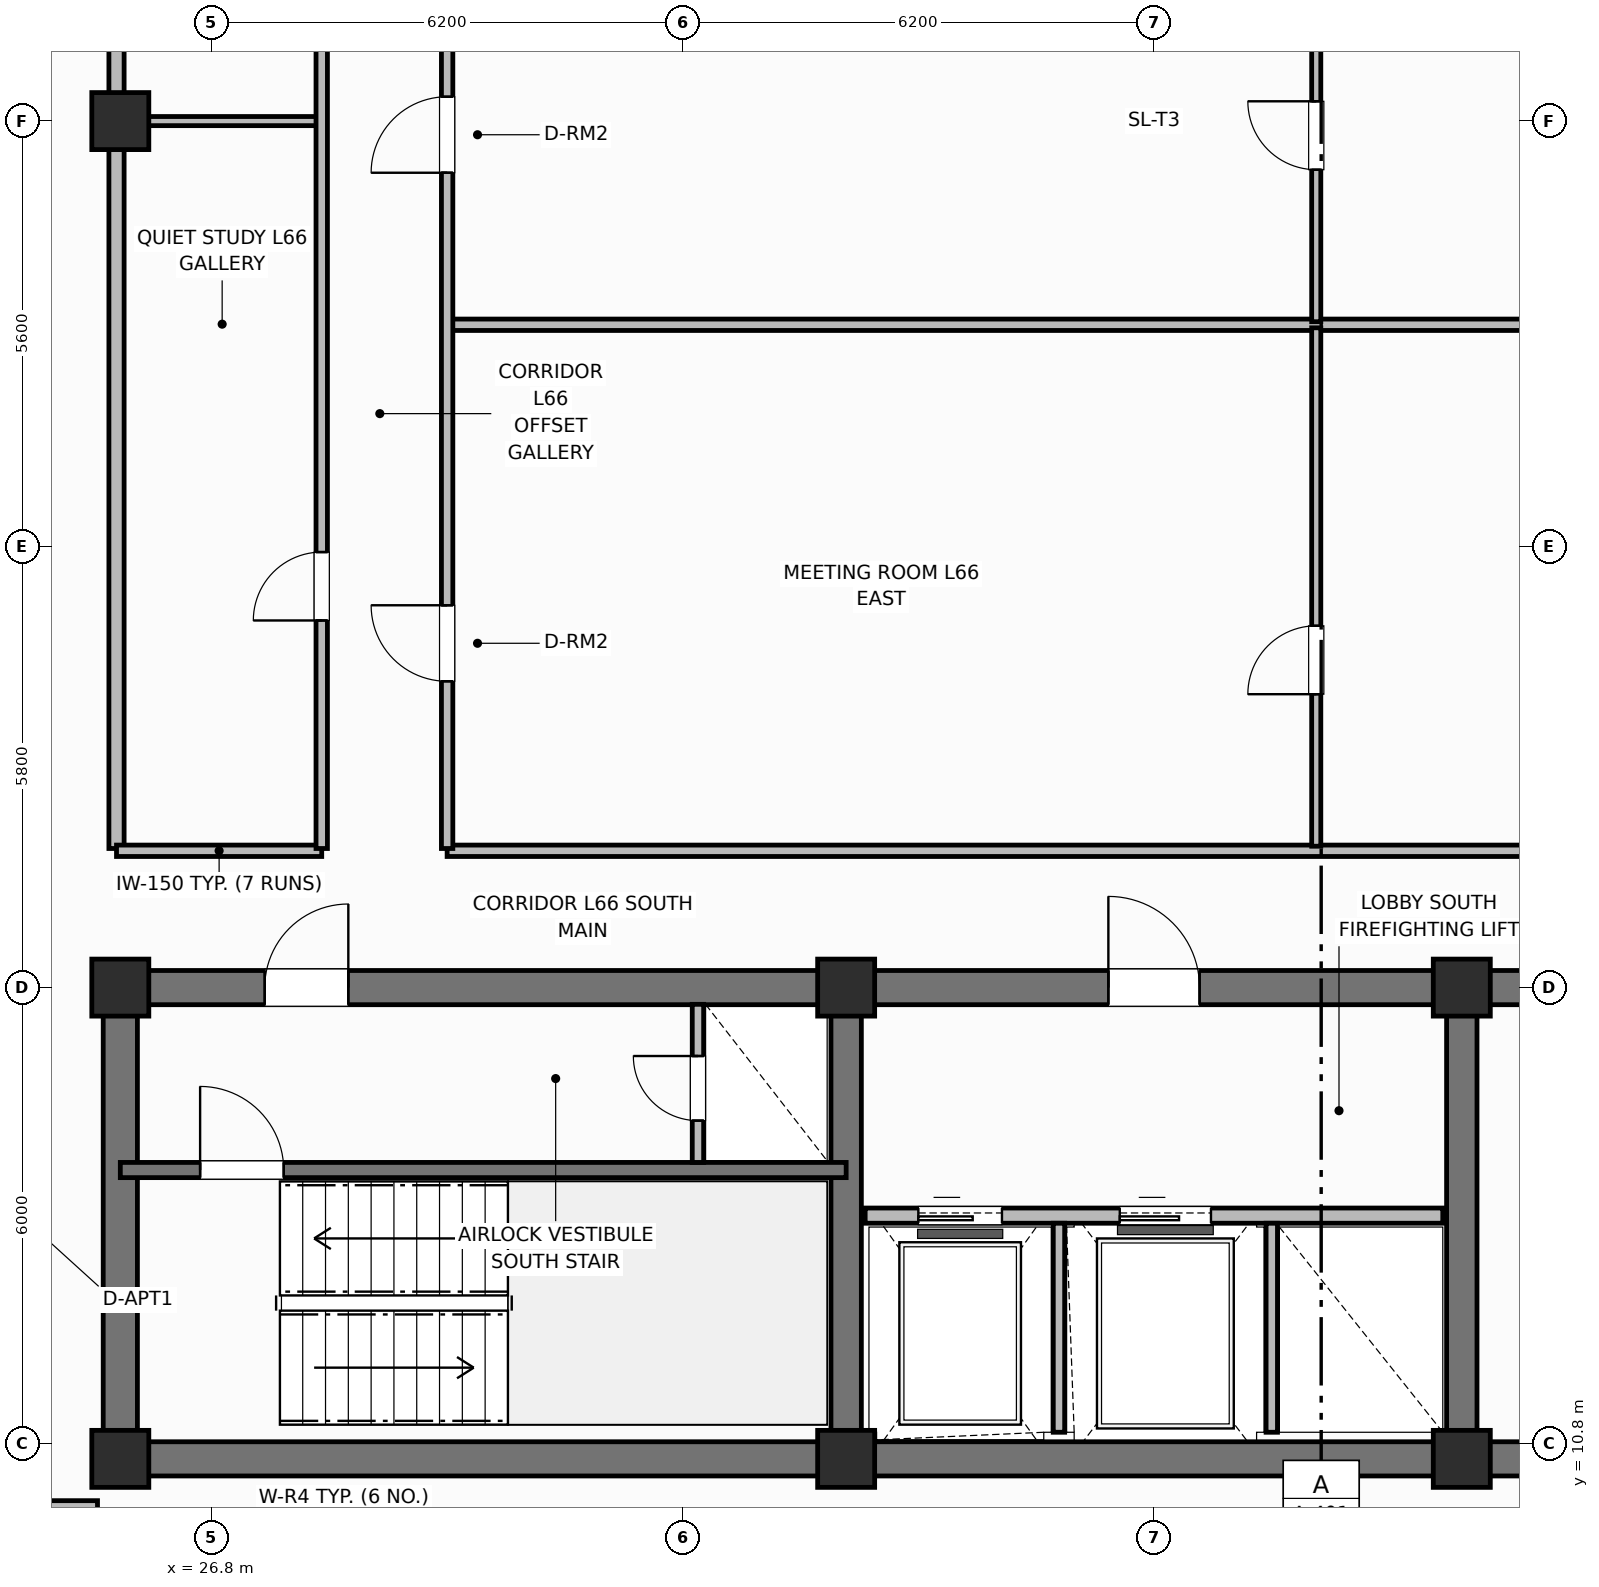
"""IFC4 building model, lengths in metres.
Left out: names, types, materials, properties, quantities, classifications, styles, units other than length and angle.
Written with IfcOpenShell. Run it as: python <this file> out.ifc"""

import sys

from ifc_helpers import new_model, si_unit, direction, frame, frame_2d, origin, origin_2d, place, context, subcontext, project, spatial, rectangle, extrude, element, fill, save


model = new_model("IFC4")
c1 = context("Model", 3, precision=1e-05, world=origin(), true_north=direction((0.0, 1.0)))
c2 = subcontext(c1, "Body", "Model", "MODEL_VIEW")
j1 = project(units=[si_unit("LENGTHUNIT", "METRE"), si_unit("PLANEANGLEUNIT", "RADIAN")], contexts=[c1])
p1 = place(None, origin())
s1 = spatial("IfcSite", under=j1, at=p1, CompositionType="ELEMENT")
p2 = place(p1, origin())
s2 = spatial("IfcBuilding", under=s1, at=p2, CompositionType="ELEMENT")
p3 = place(p2, frame((0.0, 0.0, 263.9)))
s3 = spatial("IfcBuildingStorey", under=s2, at=p3, CompositionType="ELEMENT", Elevation=263.9)
p4 = place(p3, frame((52.8, 10.6, 0.0), z_axis=(0.0, 0.0, 1.0), x_axis=(-1.0, 0.0, 0.0)))
e1 = element("IfcWall", 1, at=p4, inside=s3, PredefinedType="SHEAR", context=c2, shape_type="SweptSolid", body=[
    extrude(rectangle(XDim=27.2, YDim=0.45, at=frame_2d((13.6, 0.0))), origin(), (0.0, 0.0, 1.0), 3.7),
])
p5 = place(p3, frame((25.6, 10.825, 0.0), z_axis=(0.0, 0.0, 1.0), x_axis=(0.0, 1.0, 0.0)))
e2 = element("IfcWall", 2, at=p5, inside=s3, PredefinedType="SHEAR", context=c2, shape_type="SweptSolid", body=[
    extrude(rectangle(XDim=5.75, YDim=0.45, at=frame_2d((2.875, 0.0))), origin(), (0.0, 0.0, 1.0), 3.7),
])
p6 = place(p3, frame((25.6, 16.8, 0.0), z_axis=(0.0, 0.0, 1.0), x_axis=(1.0, 0.0, 0.0)))
e3 = element("IfcWall", 3, at=p6, inside=s3, PredefinedType="SHEAR", context=c2, shape_type="SweptSolid", body=[
    extrude(rectangle(XDim=27.2, YDim=0.45, at=frame_2d((13.6, 0.0))), origin(), (0.0, 0.0, 1.0), 3.7),
])
p7 = place(p6, frame((1.9, 0.0, 0.0)))
e4 = element("IfcOpeningElement", 4, at=p7, cuts=e3, PredefinedType="OPENING", context=c2, shape_type="SweptSolid", body=[
    extrude(rectangle(XDim=1.1, YDim=2.15, at=frame_2d((0.55, 1.075))), frame((0.0, 0.235, 0.0), z_axis=(0.0, -1.0, 0.0), x_axis=(1.0, 0.0, 0.0)), (0.0, 0.0, 1.0), 0.47),
])
p8 = place(p6, frame((13.0, 0.0, 0.0)))
e5 = element("IfcOpeningElement", 5, at=p8, cuts=e3, PredefinedType="OPENING", context=c2, shape_type="SweptSolid", body=[
    extrude(rectangle(XDim=1.2, YDim=2.15, at=frame_2d((0.6, 1.075))), frame((0.0, 0.235, 0.0), z_axis=(0.0, -1.0, 0.0), x_axis=(1.0, 0.0, 0.0)), (0.0, 0.0, 1.0), 0.47),
])
p9 = place(p6, frame((21.6, 0.0, 0.0)))
e6 = element("IfcOpeningElement", 6, at=p9, cuts=e3, PredefinedType="OPENING", context=c2, shape_type="SweptSolid", body=[
    extrude(rectangle(XDim=1.0, YDim=2.15, at=frame_2d((0.5, 1.075))), frame((0.0, 0.235, 0.0), z_axis=(0.0, -1.0, 0.0), x_axis=(1.0, 0.0, 0.0)), (0.0, 0.0, 1.0), 0.47),
])
for number, where, z_axis, x_axis in (
    (7, (35.15, 10.825, 0.0), (0.0, 0.0, 1.0), (0.0, 1.0, 0.0)),
    (8, (43.25, 10.825, 0.0), (0.0, 0.0, 1.0), (0.0, 1.0, 0.0)),
):
    element("IfcWall", number, at=place(p3, frame(where, z_axis=z_axis, x_axis=x_axis)), inside=s3, PredefinedType="SHEAR", context=c2, shape_type="SweptSolid", body=[
        extrude(rectangle(XDim=5.75, YDim=0.4, at=frame_2d((2.875, 0.0))), origin(), (0.0, 0.0, 1.0), 3.7),
    ])
for number, where, z_axis, x_axis in (
    (9, (25.6, 10.6, 0.0), (0.0, 0.0, 1.0), (1.0, 0.0, 0.0)),
    (10, (25.6, 16.8, 0.0), (0.0, 0.0, 1.0), (1.0, 0.0, 0.0)),
    (11, (35.15, 10.6, 0.0), (0.0, 0.0, 1.0), (1.0, 0.0, 0.0)),
    (12, (35.15, 16.8, 0.0), (0.0, 0.0, 1.0), (1.0, 0.0, 0.0)),
    (13, (43.25, 10.6, 0.0), (0.0, 0.0, 1.0), (1.0, 0.0, 0.0)),
    (14, (43.25, 16.8, 0.0), (0.0, 0.0, 1.0), (1.0, 0.0, 0.0)),
    (15, (25.6, 28.2, 0.0), (0.0, 0.0, 1.0), (1.0, 0.0, 0.0)),
):
    element("IfcColumn", number, at=place(p3, frame(where, z_axis=z_axis, x_axis=x_axis)), inside=s3, PredefinedType="COLUMN", context=c2, shape_type="SweptSolid", body=[
        extrude(rectangle(XDim=0.75, YDim=0.75, at=origin_2d()), origin(), (0.0, 0.0, 1.0), 3.7),
    ])
p10 = place(p3, frame((25.6, 14.4, 0.0), z_axis=(0.0, 0.0, 1.0), x_axis=(1.0, 0.0, 0.0)))
e16 = element("IfcWall", 16, at=p10, inside=s3, PredefinedType="SHEAR", context=c2, shape_type="SweptSolid", body=[
    extrude(rectangle(XDim=9.55, YDim=0.2, at=frame_2d((4.775, 0.0))), origin(), (0.0, 0.0, 1.0), 3.7),
])
p11 = place(p10, frame((1.05, 0.0, 0.0)))
e17 = element("IfcOpeningElement", 17, at=p11, cuts=e16, PredefinedType="OPENING", context=c2, shape_type="SweptSolid", body=[
    extrude(rectangle(XDim=1.1, YDim=2.15, at=frame_2d((0.55, 1.075))), frame((0.0, 0.11, 0.0), z_axis=(0.0, -1.0, 0.0), x_axis=(1.0, 0.0, 0.0)), (0.0, 0.0, 1.0), 0.22),
])
p12 = place(p3, frame((33.2, 14.5, 0.0), z_axis=(0.0, 0.0, 1.0), x_axis=(0.0, 1.0, 0.0)))
e18 = element("IfcWall", 18, at=p12, inside=s3, PredefinedType="PARTITIONING", context=c2, shape_type="SweptSolid", body=[
    extrude(rectangle(XDim=2.08, YDim=0.15, at=frame_2d((1.04, 0.0))), origin(), (0.0, 0.0, 1.0), 2.56),
])
p13 = place(p12, frame((0.55, 0.0, 0.0)))
e19 = element("IfcOpeningElement", 19, at=p13, cuts=e18, PredefinedType="OPENING", context=c2, shape_type="SweptSolid", body=[
    extrude(rectangle(XDim=0.85, YDim=2.05, at=frame_2d((0.425, 1.025))), frame((0.0, 0.085, 0.0), z_axis=(0.0, -1.0, 0.0), x_axis=(1.0, 0.0, 0.0)), (0.0, 0.0, 1.0), 0.17),
])
p14 = place(p3, frame((35.4, 13.8, 0.0), z_axis=(0.0, 0.0, 1.0), x_axis=(1.0, 0.0, 0.0)))
e20 = element("IfcWall", 20, at=p14, inside=s3, PredefinedType="PARTITIONING", context=c2, shape_type="SweptSolid", body=[
    extrude(rectangle(XDim=7.6, YDim=0.2, at=frame_2d((3.8, 0.0))), origin(), (0.0, 0.0, 1.0), 2.33),
])
p15 = place(p14, frame((0.7, 0.0, 0.0)))
e21 = element("IfcOpeningElement", 21, at=p15, cuts=e20, PredefinedType="OPENING", context=c2, shape_type="SweptSolid", body=[
    extrude(rectangle(XDim=1.1, YDim=2.15, at=frame_2d((0.55, 1.075))), frame((0.0, 0.11, 0.0), z_axis=(0.0, -1.0, 0.0), x_axis=(1.0, 0.0, 0.0)), (0.0, 0.0, 1.0), 0.22),
])
p16 = place(p14, frame((3.35, 0.0, 0.0)))
e22 = element("IfcOpeningElement", 22, at=p16, cuts=e20, PredefinedType="OPENING", context=c2, shape_type="SweptSolid", body=[
    extrude(rectangle(XDim=1.2, YDim=2.15, at=frame_2d((0.6, 1.075))), frame((0.0, 0.11, 0.0), z_axis=(0.0, -1.0, 0.0), x_axis=(1.0, 0.0, 0.0)), (0.0, 0.0, 1.0), 0.22),
])
for number, where, z_axis, x_axis in (
    (23, (37.95, 10.95, 0.0), (0.0, 0.0, 1.0), (0.0, 1.0, 0.0)),
    (24, (40.75, 10.95, 0.0), (0.0, 0.0, 1.0), (0.0, 1.0, 0.0)),
):
    element("IfcWall", number, at=place(p3, frame(where, z_axis=z_axis, x_axis=x_axis)), inside=s3, PredefinedType="PARTITIONING", context=c2, shape_type="SweptSolid", body=[
        extrude(rectangle(XDim=2.75, YDim=0.15, at=frame_2d((1.375, 0.0))), origin(), (0.0, 0.0, 1.0), 2.56),
    ])
p17 = place(p3, frame((25.55, 18.63, 0.0), z_axis=(0.0, 0.0, 1.0), x_axis=(0.0, 1.0, 0.0)))
e25 = element("IfcWall", 25, at=p17, inside=s3, PredefinedType="PARTITIONING", context=c2, shape_type="SweptSolid", body=[
    extrude(rectangle(XDim=19.14, YDim=0.2, at=frame_2d((9.57, 0.0))), origin(), (0.0, 0.0, 1.0), 2.56),
])
p18 = place(p3, frame((25.55, 18.6, 0.0), z_axis=(0.0, 0.0, 1.0), x_axis=(1.0, 0.0, 0.0)))
e26 = element("IfcWall", 26, at=p18, inside=s3, PredefinedType="PARTITIONING", context=c2, shape_type="SweptSolid", body=[
    extrude(rectangle(XDim=2.7, YDim=0.15, at=frame_2d((1.35, 0.0))), origin(), (0.0, 0.0, 1.0), 2.56),
])
p19 = place(p3, frame((29.9, 18.6, 0.0), z_axis=(0.0, 0.0, 1.0), x_axis=(1.0, 0.0, 0.0)))
e27 = element("IfcWall", 27, at=p19, inside=s3, PredefinedType="PARTITIONING", context=c2, shape_type="SweptSolid", body=[
    extrude(rectangle(XDim=22.95, YDim=0.15, at=frame_2d((11.475, 0.0))), origin(), (0.0, 0.0, 1.0), 2.56),
])
p20 = place(p3, frame((25.6, 28.2, 0.0), z_axis=(0.0, 0.0, 1.0), x_axis=(1.0, 0.0, 0.0)))
e28 = element("IfcWall", 28, at=p20, inside=s3, PredefinedType="PARTITIONING", context=c2, shape_type="SweptSolid", body=[
    extrude(rectangle(XDim=2.66, YDim=0.12, at=frame_2d((1.33, 0.0))), origin(), (0.0, 0.0, 1.0), 2.56),
])
p21 = place(p3, frame((29.93, 25.521, 0.0), z_axis=(0.0, 0.0, 1.0), x_axis=(1.0, 0.0, 0.0)))
e29 = element("IfcWall", 29, at=p21, inside=s3, PredefinedType="PARTITIONING", context=c2, shape_type="SweptSolid", body=[
    extrude(rectangle(XDim=22.87, YDim=0.15, at=frame_2d((11.435, 0.0))), origin(), (0.0, 0.0, 1.0), 2.56),
])
p22 = place(p3, frame((41.335, 18.66, 0.0), z_axis=(0.0, 0.0, 1.0), x_axis=(0.0, 1.0, 0.0)))
e30 = element("IfcWall", 30, at=p22, inside=s3, PredefinedType="PARTITIONING", context=c2, shape_type="SweptSolid", body=[
    extrude(rectangle(XDim=6.821, YDim=0.12, at=frame_2d((3.41, 0.0))), origin(), (0.0, 0.0, 1.0), 2.56),
])
p23 = place(p22, frame((2.0, 0.0, 0.0)))
e31 = element("IfcOpeningElement", 31, at=p23, cuts=e30, PredefinedType="OPENING", context=c2, shape_type="SweptSolid", body=[
    extrude(rectangle(XDim=0.9, YDim=2.1, at=frame_2d((0.45, 1.05))), frame((0.0, 0.07, 0.0), z_axis=(0.0, -1.0, 0.0), x_axis=(1.0, 0.0, 0.0)), (0.0, 0.0, 1.0), 0.14),
])
p24 = place(p3, frame((41.335, 25.56, 0.0), z_axis=(0.0, 0.0, 1.0), x_axis=(0.0, 1.0, 0.0)))
e32 = element("IfcWall", 32, at=p24, inside=s3, PredefinedType="PARTITIONING", context=c2, shape_type="SweptSolid", body=[
    extrude(rectangle(XDim=12.18, YDim=0.12, at=frame_2d((6.09, 0.0))), origin(), (0.0, 0.0, 1.0), 2.56),
])
p25 = place(p24, frame((2.0, 0.0, 0.0)))
e33 = element("IfcOpeningElement", 33, at=p25, cuts=e32, PredefinedType="OPENING", context=c2, shape_type="SweptSolid", body=[
    extrude(rectangle(XDim=0.9, YDim=2.1, at=frame_2d((0.45, 1.05))), frame((0.0, 0.07, 0.0), z_axis=(0.0, -1.0, 0.0), x_axis=(1.0, 0.0, 0.0)), (0.0, 0.0, 1.0), 0.14),
])
p26 = place(p3, frame((28.25, 18.63, 0.0), z_axis=(0.0, 0.0, 1.0), x_axis=(0.0, 1.0, 0.0)))
e34 = element("IfcWall", 34, at=p26, inside=s3, PredefinedType="PARTITIONING", context=c2, shape_type="SweptSolid", body=[
    extrude(rectangle(XDim=19.14, YDim=0.15, at=frame_2d((9.57, 0.0))), origin(), (0.0, 0.0, 1.0), 2.56),
])
p27 = place(p26, frame((3.0, 0.0, 0.0)))
e35 = element("IfcOpeningElement", 35, at=p27, cuts=e34, PredefinedType="OPENING", context=c2, shape_type="SweptSolid", body=[
    extrude(rectangle(XDim=0.9, YDim=2.1, at=frame_2d((0.45, 1.05))), frame((0.0, 0.085, 0.0), z_axis=(0.0, -1.0, 0.0), x_axis=(1.0, 0.0, 0.0)), (0.0, 0.0, 1.0), 0.17),
])
p28 = place(p26, frame((11.5, 0.0, 0.0)))
e36 = element("IfcOpeningElement", 36, at=p28, cuts=e34, PredefinedType="OPENING", context=c2, shape_type="SweptSolid", body=[
    extrude(rectangle(XDim=0.9, YDim=2.1, at=frame_2d((0.45, 1.05))), frame((0.0, 0.085, 0.0), z_axis=(0.0, -1.0, 0.0), x_axis=(1.0, 0.0, 0.0)), (0.0, 0.0, 1.0), 0.17),
])
p29 = place(p3, frame((29.9, 18.63, 0.0), z_axis=(0.0, 0.0, 1.0), x_axis=(0.0, 1.0, 0.0)))
e37 = element("IfcWall", 37, at=p29, inside=s3, PredefinedType="PARTITIONING", context=c2, shape_type="SweptSolid", body=[
    extrude(rectangle(XDim=19.14, YDim=0.15, at=frame_2d((9.57, 0.0))), origin(), (0.0, 0.0, 1.0), 2.56),
])
p30 = place(p29, frame((2.2, 0.0, 0.0)))
e38 = element("IfcOpeningElement", 38, at=p30, cuts=e37, PredefinedType="OPENING", context=c2, shape_type="SweptSolid", body=[
    extrude(rectangle(XDim=1.0, YDim=2.15, at=frame_2d((0.5, 1.075))), frame((0.0, 0.085, 0.0), z_axis=(0.0, -1.0, 0.0), x_axis=(1.0, 0.0, 0.0)), (0.0, 0.0, 1.0), 0.17),
])
p31 = place(p29, frame((8.89, 0.0, 0.0)))
e39 = element("IfcOpeningElement", 39, at=p31, cuts=e37, PredefinedType="OPENING", context=c2, shape_type="SweptSolid", body=[
    extrude(rectangle(XDim=1.0, YDim=2.15, at=frame_2d((0.5, 1.075))), frame((0.0, 0.085, 0.0), z_axis=(0.0, -1.0, 0.0), x_axis=(1.0, 0.0, 0.0)), (0.0, 0.0, 1.0), 0.17),
])
p32 = place(p3, frame((21.546, 9.95, 0.0), z_axis=(0.0, 0.0, 1.0), x_axis=(1.0, 0.0, 0.0)))
e40 = element("IfcWall", 40, at=p32, inside=s3, PredefinedType="PARTITIONING", context=c2, shape_type="SweptSolid", body=[
    extrude(rectangle(XDim=3.754, YDim=0.2, at=frame_2d((1.877, 0.0))), origin(), (0.0, 0.0, 1.0), 2.56),
])
p33 = place(p11, origin())
e41 = element("IfcDoor", 41, at=p33, inside=s3, OperationType="SINGLE_SWING_LEFT", PredefinedType="DOOR", context=c2, shape_type="SweptSolid", body=[
    extrude(rectangle(XDim=1.1, YDim=2.15, at=frame_2d((0.55, 1.075))), frame((0.0, 0.025, 0.0), z_axis=(0.0, -1.0, 0.0), x_axis=(1.0, 0.0, 0.0)), (0.0, 0.0, 1.0), 0.05),
])
fill(e17, e41)
p34 = place(p13, origin())
e42 = element("IfcDoor", 42, at=p34, inside=s3, OperationType="SINGLE_SWING_RIGHT", PredefinedType="TRAPDOOR", context=c2, shape_type="SweptSolid", body=[
    extrude(rectangle(XDim=0.85, YDim=2.05, at=frame_2d((0.425, 1.025))), frame((0.0, 0.025, 0.0), z_axis=(0.0, -1.0, 0.0), x_axis=(1.0, 0.0, 0.0)), (0.0, 0.0, 1.0), 0.05),
])
fill(e19, e42)
p35 = place(p15, origin())
e43 = element("IfcDoor", 43, at=p35, inside=s3, OperationType="SLIDING_TO_LEFT", PredefinedType="DOOR", context=c2, shape_type="SweptSolid", body=[
    extrude(rectangle(XDim=1.1, YDim=2.15, at=frame_2d((0.55, 1.075))), frame((0.0, 0.025, 0.0), z_axis=(0.0, -1.0, 0.0), x_axis=(1.0, 0.0, 0.0)), (0.0, 0.0, 1.0), 0.05),
])
fill(e21, e43)
p36 = place(p16, origin())
e44 = element("IfcDoor", 44, at=p36, inside=s3, OperationType="SLIDING_TO_LEFT", PredefinedType="DOOR", context=c2, shape_type="SweptSolid", body=[
    extrude(rectangle(XDim=1.2, YDim=2.15, at=frame_2d((0.6, 1.075))), frame((0.0, 0.025, 0.0), z_axis=(0.0, -1.0, 0.0), x_axis=(1.0, 0.0, 0.0)), (0.0, 0.0, 1.0), 0.05),
])
fill(e22, e44)
p37 = place(p23, origin())
e45 = element("IfcDoor", 45, at=p37, inside=s3, OperationType="SINGLE_SWING_LEFT", PredefinedType="DOOR", context=c2, shape_type="SweptSolid", body=[
    extrude(rectangle(XDim=0.9, YDim=2.1, at=frame_2d((0.45, 1.05))), frame((0.0, 0.025, 0.0), z_axis=(0.0, -1.0, 0.0), x_axis=(1.0, 0.0, 0.0)), (0.0, 0.0, 1.0), 0.05),
])
fill(e31, e45)
p38 = place(p25, origin())
e46 = element("IfcDoor", 46, at=p38, inside=s3, OperationType="SINGLE_SWING_RIGHT", PredefinedType="DOOR", context=c2, shape_type="SweptSolid", body=[
    extrude(rectangle(XDim=0.9, YDim=2.1, at=frame_2d((0.45, 1.05))), frame((0.0, 0.025, 0.0), z_axis=(0.0, -1.0, 0.0), x_axis=(1.0, 0.0, 0.0)), (0.0, 0.0, 1.0), 0.05),
])
fill(e33, e46)
p39 = place(p27, origin())
e47 = element("IfcDoor", 47, at=p39, inside=s3, OperationType="SINGLE_SWING_LEFT", PredefinedType="DOOR", context=c2, shape_type="SweptSolid", body=[
    extrude(rectangle(XDim=0.9, YDim=2.1, at=frame_2d((0.45, 1.05))), frame((0.0, 0.025, 0.0), z_axis=(0.0, -1.0, 0.0), x_axis=(1.0, 0.0, 0.0)), (0.0, 0.0, 1.0), 0.05),
])
fill(e35, e47)
p40 = place(p30, origin())
e48 = element("IfcDoor", 48, at=p40, inside=s3, OperationType="SINGLE_SWING_RIGHT", PredefinedType="DOOR", context=c2, shape_type="SweptSolid", body=[
    extrude(rectangle(XDim=1.0, YDim=2.15, at=frame_2d((0.5, 1.075))), frame((0.0, 0.025, 0.0), z_axis=(0.0, -1.0, 0.0), x_axis=(1.0, 0.0, 0.0)), (0.0, 0.0, 1.0), 0.05),
])
fill(e38, e48)
p41 = place(p31, origin())
e49 = element("IfcDoor", 49, at=p41, inside=s3, OperationType="SINGLE_SWING_LEFT", PredefinedType="DOOR", context=c2, shape_type="SweptSolid", body=[
    extrude(rectangle(XDim=1.0, YDim=2.15, at=frame_2d((0.5, 1.075))), frame((0.0, 0.025, 0.0), z_axis=(0.0, -1.0, 0.0), x_axis=(1.0, 0.0, 0.0)), (0.0, 0.0, 1.0), 0.05),
])
fill(e39, e49)
p42 = place(p7, origin())
e50 = element("IfcDoor", 50, at=p42, inside=s3, OperationType="SINGLE_SWING_RIGHT", PredefinedType="DOOR", context=c2, shape_type="SweptSolid", body=[
    extrude(rectangle(XDim=1.1, YDim=2.15, at=frame_2d((0.55, 1.075))), frame((0.0, 0.025, 0.0), z_axis=(0.0, -1.0, 0.0), x_axis=(1.0, 0.0, 0.0)), (0.0, 0.0, 1.0), 0.05),
])
fill(e4, e50)
p43 = place(p8, origin())
e51 = element("IfcDoor", 51, at=p43, inside=s3, OperationType="SINGLE_SWING_LEFT", PredefinedType="DOOR", context=c2, shape_type="SweptSolid", body=[
    extrude(rectangle(XDim=1.2, YDim=2.15, at=frame_2d((0.6, 1.075))), frame((0.0, 0.025, 0.0), z_axis=(0.0, -1.0, 0.0), x_axis=(1.0, 0.0, 0.0)), (0.0, 0.0, 1.0), 0.05),
])
fill(e5, e51)
save(model, sys.argv[1])
